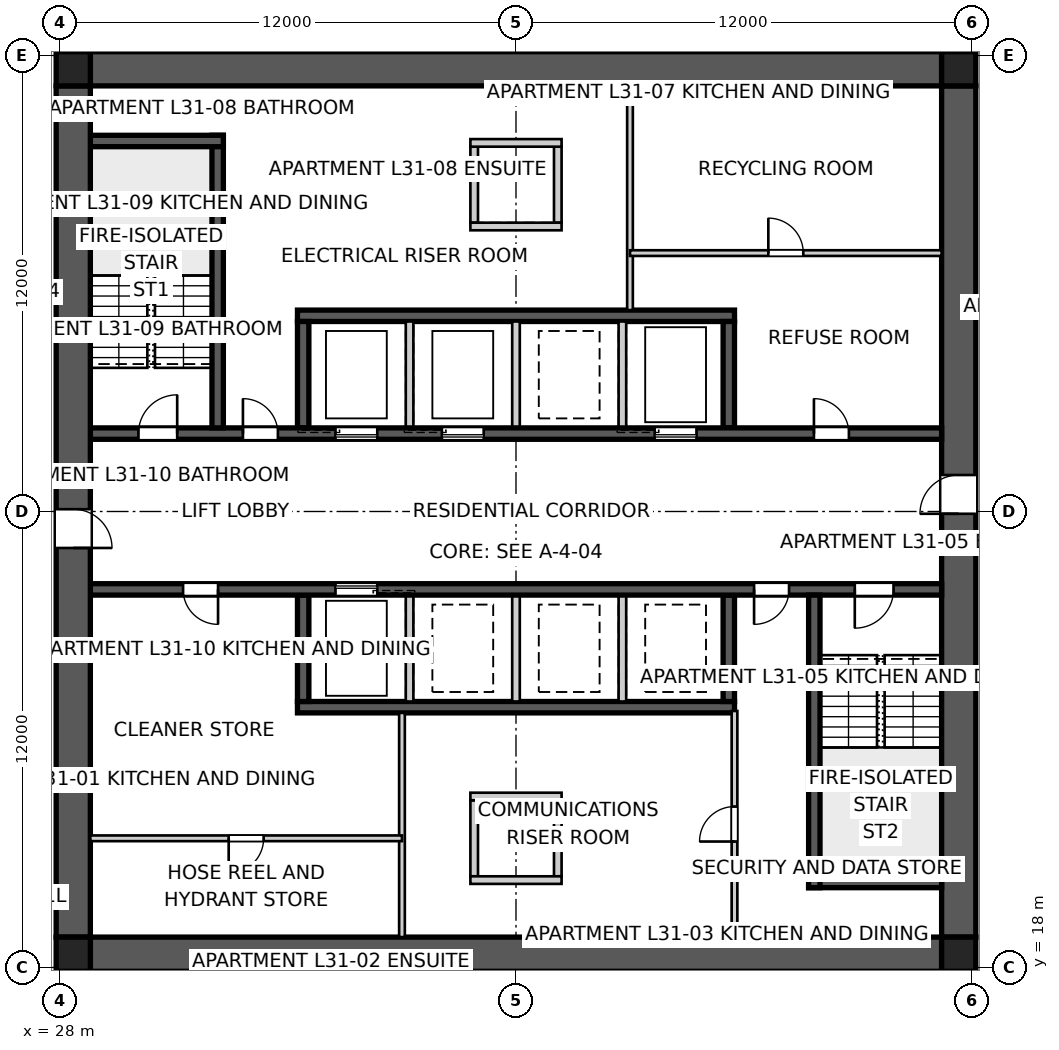
"""IFC4 building model, lengths in metres.
Left out: names, types, materials, properties, quantities, classifications, styles, units other than length and angle.
Written with IfcOpenShell. Run it as: python <this file> out.ifc"""

import sys

from ifc_helpers import new_model, si_unit, direction, frame, frame_2d, origin, origin_2d, place, context, subcontext, project, spatial, polyline, rectangle, outline, extrude, element, fill, save


model = new_model("IFC4")
c1 = context("Model", 3, precision=1e-05, world=origin(), true_north=direction((0.0, 1.0)))
c2 = subcontext(c1, "Body", "Model", "MODEL_VIEW")
j1 = project(units=[si_unit("LENGTHUNIT", "METRE"), si_unit("PLANEANGLEUNIT", "RADIAN")], contexts=[c1])
p1 = place(None, origin())
s1 = spatial("IfcSite", under=j1, at=p1, CompositionType="ELEMENT")
p2 = place(p1, origin())
s2 = spatial("IfcBuilding", under=s1, at=p2, CompositionType="ELEMENT")
p3 = place(p2, frame((0.0, 0.0, 115.0)))
s3 = spatial("IfcBuildingStorey", under=s2, at=p3, CompositionType="ELEMENT", Elevation=115.0)
for number, where, z_axis, x_axis in (
    (1, (28.8, 41.65, 0.0), (0.0, 0.0, 1.0), (1.0, 0.0, 0.0)),
    (2, (51.2, 18.35, 0.0), (0.0, 0.0, 1.0), (-1.0, 0.0, 0.0)),
):
    element("IfcWall", number, at=place(p3, frame(where, z_axis=z_axis, x_axis=x_axis)), inside=s3, PredefinedType="SHEAR", context=c2, shape_type="SweptSolid", body=[
        extrude(outline(polyline([(0.0, -0.45), (22.4, -0.45), (22.4, -0.025), (22.85, -0.025), (22.85, 0.025), (22.4, 0.025), (22.4, 0.45), (0.0, 0.45), (0.0, 0.025), (-0.45, 0.025), (-0.45, -0.025), (0.0, -0.025), (0.0, -0.45)])), origin(), (0.0, 0.0, 1.0), 3.4),
    ])
p4 = place(p3, frame((51.65, 18.8, 0.0), z_axis=(0.0, 0.0, 1.0), x_axis=(0.0, 1.0, 0.0)))
e3 = element("IfcWall", 3, at=p4, inside=s3, PredefinedType="SHEAR", context=c2, shape_type="SweptSolid", body=[
    extrude(outline(polyline([(0.0, -0.45), (22.4, -0.45), (22.4, -0.025), (22.85, -0.025), (22.85, 0.025), (22.4, 0.025), (22.4, 0.45), (0.0, 0.45), (0.0, 0.025), (-0.45, 0.025), (-0.45, -0.025), (0.0, -0.025), (0.0, -0.45)])), origin(), (0.0, 0.0, 1.0), 3.4),
])
p5 = place(p4, frame((11.14, 0.0, 0.0)))
e4 = element("IfcOpeningElement", 4, at=p5, cuts=e3, PredefinedType="OPENING", context=c2, shape_type="SweptSolid", body=[
    extrude(rectangle(XDim=1.02, YDim=2.4, at=frame_2d((0.51, 1.2))), frame((0.0, 0.46, 0.0), z_axis=(0.0, -1.0, 0.0), x_axis=(1.0, 0.0, 0.0)), (0.0, 0.0, 1.0), 0.92),
])
p6 = place(p3, frame((28.35, 41.2, 0.0), z_axis=(0.0, 0.0, 1.0), x_axis=(0.0, -1.0, 0.0)))
e5 = element("IfcWall", 5, at=p6, inside=s3, PredefinedType="SHEAR", context=c2, shape_type="SweptSolid", body=[
    extrude(outline(polyline([(0.0, -0.45), (22.4, -0.45), (22.4, -0.025), (22.85, -0.025), (22.85, 0.025), (22.4, 0.025), (22.4, 0.45), (0.0, 0.45), (0.0, 0.025), (-0.45, 0.025), (-0.45, -0.025), (0.0, -0.025), (0.0, -0.45)])), origin(), (0.0, 0.0, 1.0), 3.4),
])
p7 = place(p6, frame((11.14, 0.0, 0.0)))
e6 = element("IfcOpeningElement", 6, at=p7, cuts=e5, PredefinedType="OPENING", context=c2, shape_type="SweptSolid", body=[
    extrude(rectangle(XDim=1.02, YDim=2.4, at=frame_2d((0.51, 1.2))), frame((0.0, 0.46, 0.0), z_axis=(0.0, -1.0, 0.0), x_axis=(1.0, 0.0, 0.0)), (0.0, 0.0, 1.0), 0.92),
])
p8 = place(p3, frame((28.8, 32.05, 0.0), z_axis=(0.0, 0.0, 1.0), x_axis=(1.0, 0.0, 0.0)))
e7 = element("IfcWall", 7, at=p8, inside=s3, PredefinedType="SHEAR", context=c2, shape_type="SweptSolid", body=[
    extrude(rectangle(XDim=22.4, YDim=0.3, at=frame_2d((11.2, 0.0))), origin(), (0.0, 0.0, 1.0), 3.4),
])
p9 = place(p8, frame((19.04, 0.0, 0.0)))
e8 = element("IfcOpeningElement", 8, at=p9, cuts=e7, PredefinedType="OPENING", context=c2, shape_type="SweptSolid", body=[
    extrude(rectangle(XDim=0.92, YDim=2.1, at=frame_2d((0.46, 1.05))), frame((0.0, 0.16, 0.0), z_axis=(0.0, -1.0, 0.0), x_axis=(1.0, 0.0, 0.0)), (0.0, 0.0, 1.0), 0.32),
])
p10 = place(p8, frame((1.265, 0.0, 0.0)))
e9 = element("IfcOpeningElement", 9, at=p10, cuts=e7, PredefinedType="OPENING", context=c2, shape_type="SweptSolid", body=[
    extrude(rectangle(XDim=1.02, YDim=2.1, at=frame_2d((0.51, 1.05))), frame((0.0, 0.16, 0.0), z_axis=(0.0, -1.0, 0.0), x_axis=(1.0, 0.0, 0.0)), (0.0, 0.0, 1.0), 0.32),
])
p11 = place(p8, frame((4.015, 0.0, 0.0)))
e10 = element("IfcOpeningElement", 10, at=p11, cuts=e7, PredefinedType="OPENING", context=c2, shape_type="SweptSolid", body=[
    extrude(rectangle(XDim=0.92, YDim=2.1, at=frame_2d((0.46, 1.05))), frame((0.0, 0.16, 0.0), z_axis=(0.0, -1.0, 0.0), x_axis=(1.0, 0.0, 0.0)), (0.0, 0.0, 1.0), 0.32),
])
p12 = place(p8, frame((6.45, 0.0, 0.0)))
e11 = element("IfcOpeningElement", 11, at=p12, cuts=e7, PredefinedType="OPENING", context=c2, shape_type="SweptSolid", body=[
    extrude(rectangle(XDim=1.1, YDim=2.1, at=frame_2d((0.55, 1.05))), frame((0.0, 0.16, 0.0), z_axis=(0.0, -1.0, 0.0), x_axis=(1.0, 0.0, 0.0)), (0.0, 0.0, 1.0), 0.32),
])
p13 = place(p8, frame((9.25, 0.0, 0.0)))
e12 = element("IfcOpeningElement", 12, at=p13, cuts=e7, PredefinedType="OPENING", context=c2, shape_type="SweptSolid", body=[
    extrude(rectangle(XDim=1.1, YDim=2.1, at=frame_2d((0.55, 1.05))), frame((0.0, 0.16, 0.0), z_axis=(0.0, -1.0, 0.0), x_axis=(1.0, 0.0, 0.0)), (0.0, 0.0, 1.0), 0.32),
])
p14 = place(p8, frame((14.85, 0.0, 0.0)))
e13 = element("IfcOpeningElement", 13, at=p14, cuts=e7, PredefinedType="OPENING", context=c2, shape_type="SweptSolid", body=[
    extrude(rectangle(XDim=1.1, YDim=2.1, at=frame_2d((0.55, 1.05))), frame((0.0, 0.16, 0.0), z_axis=(0.0, -1.0, 0.0), x_axis=(1.0, 0.0, 0.0)), (0.0, 0.0, 1.0), 0.32),
])
p15 = place(p3, frame((51.2, 27.95, 0.0), z_axis=(0.0, 0.0, 1.0), x_axis=(-1.0, 0.0, 0.0)))
e14 = element("IfcWall", 14, at=p15, inside=s3, PredefinedType="SHEAR", context=c2, shape_type="SweptSolid", body=[
    extrude(rectangle(XDim=22.4, YDim=0.3, at=frame_2d((11.2, 0.0))), origin(), (0.0, 0.0, 1.0), 3.4),
])
p16 = place(p15, frame((19.04, 0.0, 0.0)))
e15 = element("IfcOpeningElement", 15, at=p16, cuts=e14, PredefinedType="OPENING", context=c2, shape_type="SweptSolid", body=[
    extrude(rectangle(XDim=0.92, YDim=2.1, at=frame_2d((0.46, 1.05))), frame((0.0, 0.16, 0.0), z_axis=(0.0, -1.0, 0.0), x_axis=(1.0, 0.0, 0.0)), (0.0, 0.0, 1.0), 0.32),
])
p17 = place(p15, frame((1.265, 0.0, 0.0)))
e16 = element("IfcOpeningElement", 16, at=p17, cuts=e14, PredefinedType="OPENING", context=c2, shape_type="SweptSolid", body=[
    extrude(rectangle(XDim=1.02, YDim=2.1, at=frame_2d((0.51, 1.05))), frame((0.0, 0.16, 0.0), z_axis=(0.0, -1.0, 0.0), x_axis=(1.0, 0.0, 0.0)), (0.0, 0.0, 1.0), 0.32),
])
p18 = place(p15, frame((4.015, 0.0, 0.0)))
e17 = element("IfcOpeningElement", 17, at=p18, cuts=e14, PredefinedType="OPENING", context=c2, shape_type="SweptSolid", body=[
    extrude(rectangle(XDim=0.92, YDim=2.1, at=frame_2d((0.46, 1.05))), frame((0.0, 0.16, 0.0), z_axis=(0.0, -1.0, 0.0), x_axis=(1.0, 0.0, 0.0)), (0.0, 0.0, 1.0), 0.32),
])
p19 = place(p15, frame((14.85, 0.0, 0.0)))
e18 = element("IfcOpeningElement", 18, at=p19, cuts=e14, PredefinedType="OPENING", context=c2, shape_type="SweptSolid", body=[
    extrude(rectangle(XDim=1.1, YDim=2.1, at=frame_2d((0.55, 1.05))), frame((0.0, 0.16, 0.0), z_axis=(0.0, -1.0, 0.0), x_axis=(1.0, 0.0, 0.0)), (0.0, 0.0, 1.0), 0.32),
])
for number, where, z_axis, x_axis in (
    (19, (34.25, 35.15, 0.0), (0.0, 0.0, 1.0), (1.0, 0.0, 0.0)),
    (20, (45.75, 24.85, 0.0), (0.0, 0.0, 1.0), (-1.0, 0.0, 0.0)),
):
    element("IfcWall", number, at=place(p3, frame(where, z_axis=z_axis, x_axis=x_axis)), inside=s3, PredefinedType="SHEAR", context=c2, shape_type="SweptSolid", body=[
        extrude(rectangle(XDim=11.5, YDim=0.3, at=frame_2d((5.75, 0.0))), origin(), (0.0, 0.0, 1.0), 3.4),
    ])
for number, where, z_axis, x_axis in (
    (21, (34.4, 32.2, 0.0), (0.0, 0.0, 1.0), (0.0, 1.0, 0.0)),
    (22, (45.6, 27.8, 0.0), (0.0, 0.0, 1.0), (0.0, -1.0, 0.0)),
):
    element("IfcWall", number, at=place(p3, frame(where, z_axis=z_axis, x_axis=x_axis)), inside=s3, PredefinedType="SHEAR", context=c2, shape_type="SweptSolid", body=[
        extrude(rectangle(XDim=2.8, YDim=0.3, at=frame_2d((1.4, 0.0))), origin(), (0.0, 0.0, 1.0), 3.4),
    ])
for number, where, z_axis, x_axis in (
    (23, (37.2, 32.2, 0.0), (0.0, 0.0, 1.0), (0.0, 1.0, 0.0)),
    (24, (42.8, 27.8, 0.0), (0.0, 0.0, 1.0), (0.0, -1.0, 0.0)),
    (25, (40.0, 32.2, 0.0), (0.0, 0.0, 1.0), (0.0, 1.0, 0.0)),
    (26, (40.0, 27.8, 0.0), (0.0, 0.0, 1.0), (0.0, -1.0, 0.0)),
    (27, (42.8, 32.2, 0.0), (0.0, 0.0, 1.0), (0.0, 1.0, 0.0)),
    (28, (37.2, 27.8, 0.0), (0.0, 0.0, 1.0), (0.0, -1.0, 0.0)),
):
    element("IfcWall", number, at=place(p3, frame(where, z_axis=z_axis, x_axis=x_axis)), inside=s3, PredefinedType="SOLIDWALL", context=c2, shape_type="SweptSolid", body=[
        extrude(rectangle(XDim=2.8, YDim=0.2, at=frame_2d((1.4, 0.0))), origin(), (0.0, 0.0, 1.0), 3.4),
    ])
for number, where, z_axis, x_axis in (
    (29, (45.6, 32.2, 0.0), (0.0, 0.0, 1.0), (0.0, 1.0, 0.0)),
    (30, (34.4, 27.8, 0.0), (0.0, 0.0, 1.0), (0.0, -1.0, 0.0)),
):
    element("IfcWall", number, at=place(p3, frame(where, z_axis=z_axis, x_axis=x_axis)), inside=s3, PredefinedType="SHEAR", context=c2, shape_type="SweptSolid", body=[
        extrude(rectangle(XDim=2.8, YDim=0.3, at=frame_2d((1.4, 0.0))), origin(), (0.0, 0.0, 1.0), 3.4),
    ])
p20 = place(p3, frame((32.15, 32.2, 0.0), z_axis=(0.0, 0.0, 1.0), x_axis=(0.0, 1.0, 0.0)))
e31 = element("IfcWall", 31, at=p20, inside=s3, PredefinedType="SHEAR", context=c2, shape_type="SweptSolid", body=[
    extrude(rectangle(XDim=7.7, YDim=0.3, at=frame_2d((3.85, 0.0))), origin(), (0.0, 0.0, 1.0), 3.4),
])
p21 = place(p3, frame((28.8, 39.75, 0.0), z_axis=(0.0, 0.0, 1.0), x_axis=(1.0, 0.0, 0.0)))
e32 = element("IfcWall", 32, at=p21, inside=s3, PredefinedType="SHEAR", context=c2, shape_type="SweptSolid", body=[
    extrude(rectangle(XDim=3.5, YDim=0.3, at=frame_2d((1.75, 0.0))), origin(), (0.0, 0.0, 1.0), 3.4),
])
p22 = place(p3, frame((47.85, 27.8, 0.0), z_axis=(0.0, 0.0, 1.0), x_axis=(0.0, -1.0, 0.0)))
e33 = element("IfcWall", 33, at=p22, inside=s3, PredefinedType="SHEAR", context=c2, shape_type="SweptSolid", body=[
    extrude(rectangle(XDim=7.7, YDim=0.3, at=frame_2d((3.85, 0.0))), origin(), (0.0, 0.0, 1.0), 3.4),
])
p23 = place(p3, frame((51.2, 20.25, 0.0), z_axis=(0.0, 0.0, 1.0), x_axis=(-1.0, 0.0, 0.0)))
e34 = element("IfcWall", 34, at=p23, inside=s3, PredefinedType="SHEAR", context=c2, shape_type="SweptSolid", body=[
    extrude(rectangle(XDim=3.5, YDim=0.3, at=frame_2d((1.75, 0.0))), origin(), (0.0, 0.0, 1.0), 3.4),
])
for number, where, z_axis, x_axis in (
    (35, (38.9, 37.6, 0.0), (0.0, 0.0, 1.0), (0.0, 1.0, 0.0)),
    (36, (41.1, 37.6, 0.0), (0.0, 0.0, 1.0), (0.0, 1.0, 0.0)),
):
    element("IfcWall", number, at=place(p3, frame(where, z_axis=z_axis, x_axis=x_axis)), inside=s3, PredefinedType="SOLIDWALL", context=c2, shape_type="SweptSolid", body=[
        extrude(rectangle(XDim=2.0, YDim=0.2, at=frame_2d((1.0, 0.0))), origin(), (0.0, 0.0, 1.0), 3.4),
    ])
for number, where, z_axis, x_axis in (
    (37, (38.8, 37.5, 0.0), (0.0, 0.0, 1.0), (1.0, 0.0, 0.0)),
    (38, (38.8, 39.7, 0.0), (0.0, 0.0, 1.0), (1.0, 0.0, 0.0)),
):
    element("IfcWall", number, at=place(p3, frame(where, z_axis=z_axis, x_axis=x_axis)), inside=s3, PredefinedType="SOLIDWALL", context=c2, shape_type="SweptSolid", body=[
        extrude(rectangle(XDim=2.4, YDim=0.2, at=frame_2d((1.2, 0.0))), origin(), (0.0, 0.0, 1.0), 3.4),
    ])
for number, where, z_axis, x_axis in (
    (39, (38.9, 22.4, 0.0), (0.0, 0.0, 1.0), (0.0, -1.0, 0.0)),
    (40, (41.1, 22.4, 0.0), (0.0, 0.0, 1.0), (0.0, -1.0, 0.0)),
):
    element("IfcWall", number, at=place(p3, frame(where, z_axis=z_axis, x_axis=x_axis)), inside=s3, PredefinedType="SOLIDWALL", context=c2, shape_type="SweptSolid", body=[
        extrude(rectangle(XDim=2.0, YDim=0.2, at=frame_2d((1.0, 0.0))), origin(), (0.0, 0.0, 1.0), 3.4),
    ])
for number, where, z_axis, x_axis in (
    (41, (38.8, 22.5, 0.0), (0.0, 0.0, 1.0), (1.0, 0.0, 0.0)),
    (42, (38.8, 20.3, 0.0), (0.0, 0.0, 1.0), (1.0, 0.0, 0.0)),
):
    element("IfcWall", number, at=place(p3, frame(where, z_axis=z_axis, x_axis=x_axis)), inside=s3, PredefinedType="SOLIDWALL", context=c2, shape_type="SweptSolid", body=[
        extrude(rectangle(XDim=2.4, YDim=0.2, at=frame_2d((1.2, 0.0))), origin(), (0.0, 0.0, 1.0), 3.4),
    ])
for number, where, z_axis, x_axis in (
    (43, (28.35, 18.35, 0.0), (0.0, 0.0, 1.0), (1.0, 0.0, 0.0)),
    (44, (51.65, 18.35, 0.0), (0.0, 0.0, 1.0), (1.0, 0.0, 0.0)),
    (45, (51.65, 41.65, 0.0), (0.0, 0.0, 1.0), (1.0, 0.0, 0.0)),
    (46, (28.35, 41.65, 0.0), (0.0, 0.0, 1.0), (1.0, 0.0, 0.0)),
):
    element("IfcColumn", number, at=place(p3, frame(where, z_axis=z_axis, x_axis=x_axis)), inside=s3, PredefinedType="COLUMN", context=c2, shape_type="SweptSolid", body=[
        extrude(rectangle(XDim=0.9, YDim=0.9, at=origin_2d()), origin(), (0.0, 0.0, 1.0), 3.4),
    ])
p24 = place(p3, frame((43.0, 41.2, 0.0), z_axis=(0.0, 0.0, 1.0), x_axis=(0.0, -1.0, 0.0)))
e47 = element("IfcWall", 47, at=p24, inside=s3, PredefinedType="SOLIDWALL", context=c2, shape_type="SweptSolid", body=[
    extrude(rectangle(XDim=5.9, YDim=0.15, at=frame_2d((2.95, 0.0))), origin(), (0.0, 0.0, 1.0), 3.25),
])
p25 = place(p3, frame((43.0, 36.8, 0.0), z_axis=(0.0, 0.0, 1.0), x_axis=(1.0, 0.0, 0.0)))
e48 = element("IfcWall", 48, at=p25, inside=s3, PredefinedType="SOLIDWALL", context=c2, shape_type="SweptSolid", body=[
    extrude(rectangle(XDim=8.2, YDim=0.15, at=frame_2d((4.1, 0.0))), origin(), (0.0, 0.0, 1.0), 3.25),
])
p26 = place(p25, frame((3.64, 0.0, 0.0)))
e49 = element("IfcOpeningElement", 49, at=p26, cuts=e48, PredefinedType="OPENING", context=c2, shape_type="SweptSolid", body=[
    extrude(rectangle(XDim=0.92, YDim=2.1, at=frame_2d((0.46, 1.05))), frame((0.0, 0.085, 0.0), z_axis=(0.0, -1.0, 0.0), x_axis=(1.0, 0.0, 0.0)), (0.0, 0.0, 1.0), 0.17),
])
p27 = place(p3, frame((45.75, 18.8, 0.0), z_axis=(0.0, 0.0, 1.0), x_axis=(0.0, 1.0, 0.0)))
e50 = element("IfcWall", 50, at=p27, inside=s3, PredefinedType="SOLIDWALL", context=c2, shape_type="SweptSolid", body=[
    extrude(rectangle(XDim=5.95, YDim=0.15, at=frame_2d((2.975, 0.0))), origin(), (0.0, 0.0, 1.0), 3.25),
])
p28 = place(p27, frame((2.515, 0.0, 0.0)))
e51 = element("IfcOpeningElement", 51, at=p28, cuts=e50, PredefinedType="OPENING", context=c2, shape_type="SweptSolid", body=[
    extrude(rectangle(XDim=0.92, YDim=2.1, at=frame_2d((0.46, 1.05))), frame((0.0, 0.085, 0.0), z_axis=(0.0, -1.0, 0.0), x_axis=(1.0, 0.0, 0.0)), (0.0, 0.0, 1.0), 0.17),
])
p29 = place(p3, frame((37.0, 18.8, 0.0), z_axis=(0.0, 0.0, 1.0), x_axis=(0.0, 1.0, 0.0)))
e52 = element("IfcWall", 52, at=p29, inside=s3, PredefinedType="SOLIDWALL", context=c2, shape_type="SweptSolid", body=[
    extrude(rectangle(XDim=5.9, YDim=0.15, at=frame_2d((2.95, 0.0))), origin(), (0.0, 0.0, 1.0), 3.25),
])
p30 = place(p3, frame((37.0, 21.4, 0.0), z_axis=(0.0, 0.0, 1.0), x_axis=(-1.0, 0.0, 0.0)))
e53 = element("IfcWall", 53, at=p30, inside=s3, PredefinedType="SOLIDWALL", context=c2, shape_type="SweptSolid", body=[
    extrude(rectangle(XDim=8.2, YDim=0.15, at=frame_2d((4.1, 0.0))), origin(), (0.0, 0.0, 1.0), 3.25),
])
p31 = place(p30, frame((3.64, 0.0, 0.0)))
e54 = element("IfcOpeningElement", 54, at=p31, cuts=e53, PredefinedType="OPENING", context=c2, shape_type="SweptSolid", body=[
    extrude(rectangle(XDim=0.92, YDim=2.1, at=frame_2d((0.46, 1.05))), frame((0.0, 0.085, 0.0), z_axis=(0.0, -1.0, 0.0), x_axis=(1.0, 0.0, 0.0)), (0.0, 0.0, 1.0), 0.17),
])
p32 = place(p9, origin())
e55 = element("IfcDoor", 55, at=p32, inside=s3, OperationType="SINGLE_SWING_LEFT", PredefinedType="DOOR", context=c2, shape_type="SweptSolid", body=[
    extrude(rectangle(XDim=0.92, YDim=2.1, at=frame_2d((0.46, 1.05))), frame((0.0, 0.025, 0.0), z_axis=(0.0, -1.0, 0.0), x_axis=(1.0, 0.0, 0.0)), (0.0, 0.0, 1.0), 0.05),
])
fill(e8, e55)
p33 = place(p16, origin())
e56 = element("IfcDoor", 56, at=p33, inside=s3, OperationType="SINGLE_SWING_LEFT", PredefinedType="DOOR", context=c2, shape_type="SweptSolid", body=[
    extrude(rectangle(XDim=0.92, YDim=2.1, at=frame_2d((0.46, 1.05))), frame((0.0, 0.025, 0.0), z_axis=(0.0, -1.0, 0.0), x_axis=(1.0, 0.0, 0.0)), (0.0, 0.0, 1.0), 0.05),
])
fill(e15, e56)
p34 = place(p17, origin())
e57 = element("IfcDoor", 57, at=p34, inside=s3, OperationType="SINGLE_SWING_RIGHT", PredefinedType="DOOR", context=c2, shape_type="SweptSolid", body=[
    extrude(rectangle(XDim=1.02, YDim=2.1, at=frame_2d((0.51, 1.05))), frame((0.0, 0.025, 0.0), z_axis=(0.0, -1.0, 0.0), x_axis=(1.0, 0.0, 0.0)), (0.0, 0.0, 1.0), 0.05),
])
fill(e16, e57)
p35 = place(p10, origin())
e58 = element("IfcDoor", 58, at=p35, inside=s3, OperationType="SINGLE_SWING_RIGHT", PredefinedType="DOOR", context=c2, shape_type="SweptSolid", body=[
    extrude(rectangle(XDim=1.02, YDim=2.1, at=frame_2d((0.51, 1.05))), frame((0.0, 0.025, 0.0), z_axis=(0.0, -1.0, 0.0), x_axis=(1.0, 0.0, 0.0)), (0.0, 0.0, 1.0), 0.05),
])
fill(e9, e58)
p36 = place(p11, origin())
e59 = element("IfcDoor", 59, at=p36, inside=s3, OperationType="SINGLE_SWING_LEFT", PredefinedType="DOOR", context=c2, shape_type="SweptSolid", body=[
    extrude(rectangle(XDim=0.92, YDim=2.1, at=frame_2d((0.46, 1.05))), frame((0.0, 0.025, 0.0), z_axis=(0.0, -1.0, 0.0), x_axis=(1.0, 0.0, 0.0)), (0.0, 0.0, 1.0), 0.05),
])
fill(e10, e59)
p37 = place(p18, origin())
e60 = element("IfcDoor", 60, at=p37, inside=s3, OperationType="SINGLE_SWING_RIGHT", PredefinedType="DOOR", context=c2, shape_type="SweptSolid", body=[
    extrude(rectangle(XDim=0.92, YDim=2.1, at=frame_2d((0.46, 1.05))), frame((0.0, 0.025, 0.0), z_axis=(0.0, -1.0, 0.0), x_axis=(1.0, 0.0, 0.0)), (0.0, 0.0, 1.0), 0.05),
])
fill(e17, e60)
p38 = place(p26, origin())
e61 = element("IfcDoor", 61, at=p38, inside=s3, OperationType="SINGLE_SWING_LEFT", PredefinedType="DOOR", context=c2, shape_type="SweptSolid", body=[
    extrude(rectangle(XDim=0.92, YDim=2.1, at=frame_2d((0.46, 1.05))), frame((0.0, 0.025, 0.0), z_axis=(0.0, -1.0, 0.0), x_axis=(1.0, 0.0, 0.0)), (0.0, 0.0, 1.0), 0.05),
])
fill(e49, e61)
p39 = place(p31, origin())
e62 = element("IfcDoor", 62, at=p39, inside=s3, OperationType="SINGLE_SWING_RIGHT", PredefinedType="DOOR", context=c2, shape_type="SweptSolid", body=[
    extrude(rectangle(XDim=0.92, YDim=2.1, at=frame_2d((0.46, 1.05))), frame((0.0, 0.025, 0.0), z_axis=(0.0, -1.0, 0.0), x_axis=(1.0, 0.0, 0.0)), (0.0, 0.0, 1.0), 0.05),
])
fill(e54, e62)
p40 = place(p28, origin())
e63 = element("IfcDoor", 63, at=p40, inside=s3, OperationType="SINGLE_SWING_LEFT", PredefinedType="DOOR", context=c2, shape_type="SweptSolid", body=[
    extrude(rectangle(XDim=0.92, YDim=2.1, at=frame_2d((0.46, 1.05))), frame((0.0, 0.025, 0.0), z_axis=(0.0, -1.0, 0.0), x_axis=(1.0, 0.0, 0.0)), (0.0, 0.0, 1.0), 0.05),
])
fill(e51, e63)
p41 = place(p5, origin())
e64 = element("IfcDoor", 64, at=p41, inside=s3, OperationType="SINGLE_SWING_LEFT", PredefinedType="DOOR", context=c2, shape_type="SweptSolid", body=[
    extrude(rectangle(XDim=1.02, YDim=2.4, at=frame_2d((0.51, 1.2))), frame((0.0, 0.025, 0.0), z_axis=(0.0, -1.0, 0.0), x_axis=(1.0, 0.0, 0.0)), (0.0, 0.0, 1.0), 0.05),
])
fill(e4, e64)
p42 = place(p7, origin())
e65 = element("IfcDoor", 65, at=p42, inside=s3, OperationType="SINGLE_SWING_RIGHT", PredefinedType="DOOR", context=c2, shape_type="SweptSolid", body=[
    extrude(rectangle(XDim=1.02, YDim=2.4, at=frame_2d((0.51, 1.2))), frame((0.0, 0.025, 0.0), z_axis=(0.0, -1.0, 0.0), x_axis=(1.0, 0.0, 0.0)), (0.0, 0.0, 1.0), 0.05),
])
fill(e6, e65)
p43 = place(p12, origin())
e66 = element("IfcDoor", 66, at=p43, inside=s3, OperationType="SLIDING_TO_LEFT", PredefinedType="DOOR", context=c2, shape_type="SweptSolid", body=[
    extrude(rectangle(XDim=1.1, YDim=2.1, at=frame_2d((0.55, 1.05))), frame((0.0, 0.025, 0.0), z_axis=(0.0, -1.0, 0.0), x_axis=(1.0, 0.0, 0.0)), (0.0, 0.0, 1.0), 0.05),
])
fill(e11, e66)
p44 = place(p13, origin())
e67 = element("IfcDoor", 67, at=p44, inside=s3, OperationType="SLIDING_TO_LEFT", PredefinedType="DOOR", context=c2, shape_type="SweptSolid", body=[
    extrude(rectangle(XDim=1.1, YDim=2.1, at=frame_2d((0.55, 1.05))), frame((0.0, 0.025, 0.0), z_axis=(0.0, -1.0, 0.0), x_axis=(1.0, 0.0, 0.0)), (0.0, 0.0, 1.0), 0.05),
])
fill(e12, e67)
p45 = place(p14, origin())
e68 = element("IfcDoor", 68, at=p45, inside=s3, OperationType="SLIDING_TO_LEFT", PredefinedType="DOOR", context=c2, shape_type="SweptSolid", body=[
    extrude(rectangle(XDim=1.1, YDim=2.1, at=frame_2d((0.55, 1.05))), frame((0.0, 0.025, 0.0), z_axis=(0.0, -1.0, 0.0), x_axis=(1.0, 0.0, 0.0)), (0.0, 0.0, 1.0), 0.05),
])
fill(e13, e68)
p46 = place(p19, origin())
e69 = element("IfcDoor", 69, at=p46, inside=s3, OperationType="SLIDING_TO_LEFT", PredefinedType="DOOR", context=c2, shape_type="SweptSolid", body=[
    extrude(rectangle(XDim=1.1, YDim=2.1, at=frame_2d((0.55, 1.05))), frame((0.0, 0.025, 0.0), z_axis=(0.0, -1.0, 0.0), x_axis=(1.0, 0.0, 0.0)), (0.0, 0.0, 1.0), 0.05),
])
fill(e18, e69)
save(model, sys.argv[1])
